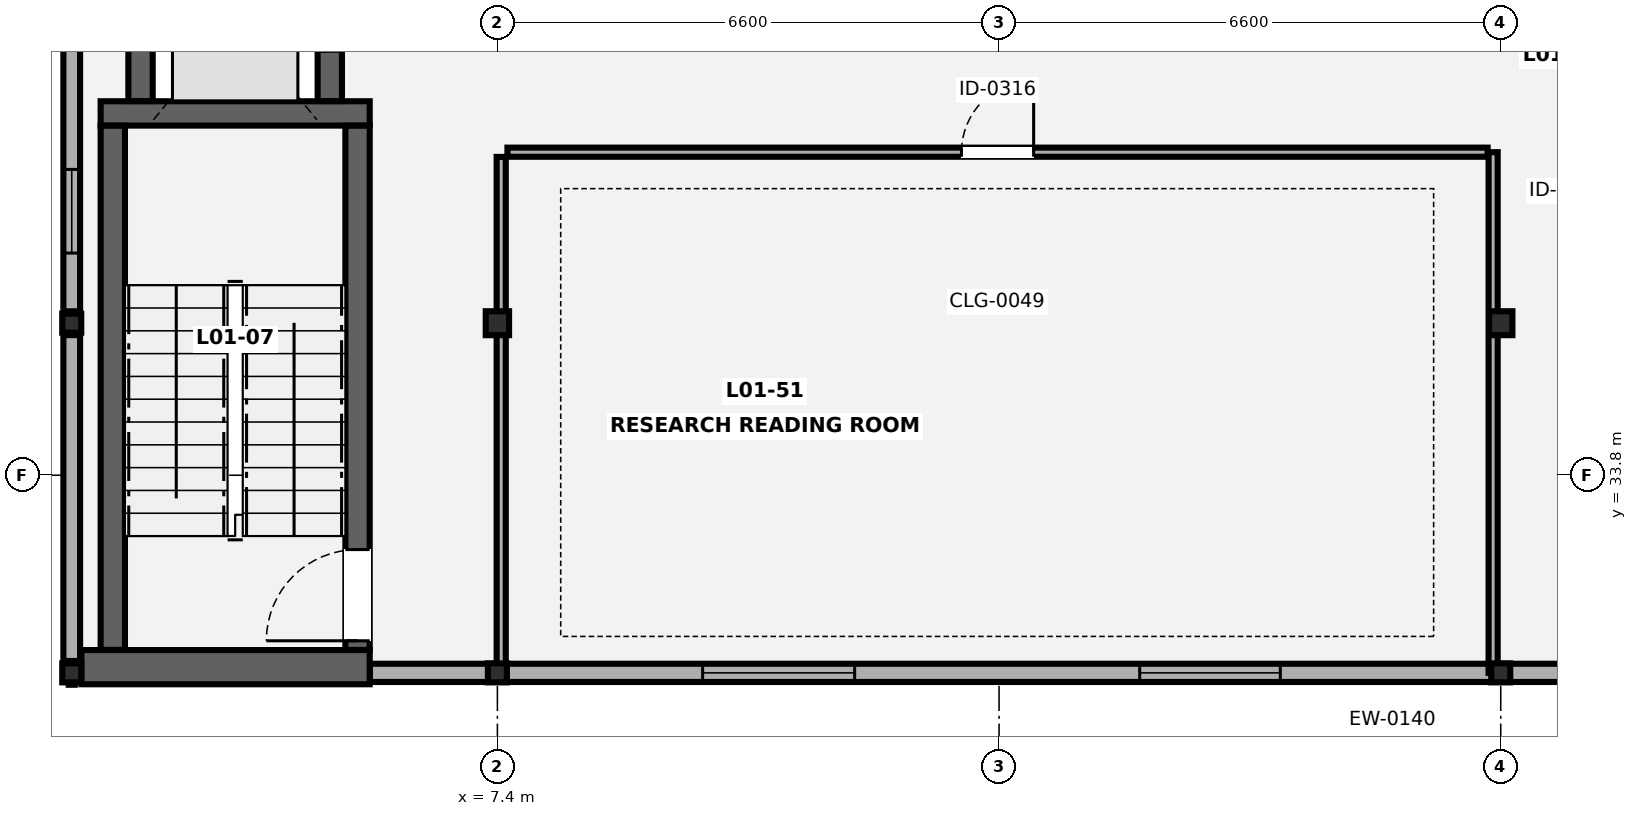
"""IFC4 building model, lengths in metres.
Left out: names, types, materials, properties, quantities, classifications, styles, units other than length and angle.
Written with IfcOpenShell. Run it as: python <this file> out.ifc"""

import sys

from ifc_helpers import new_model, si_unit, direction, frame, frame_2d, origin, origin_2d, place, context, subcontext, project, spatial, rectangle, hollow_rectangle, i_section, extrude, element, fill, save


model = new_model("IFC4")
c1 = context("Model", 3, precision=1e-05, world=origin(), true_north=direction((0.0, 1.0)))
c2 = subcontext(c1, "Body", "Model", "MODEL_VIEW")
j1 = project(units=[si_unit("LENGTHUNIT", "METRE"), si_unit("PLANEANGLEUNIT", "RADIAN")], contexts=[c1])
p1 = place(None, origin())
s1 = spatial("IfcSite", under=j1, at=p1, CompositionType="ELEMENT")
p2 = place(p1, origin())
s2 = spatial("IfcBuilding", under=s1, at=p2, CompositionType="ELEMENT")
p3 = place(p2, frame((0.0, 0.0, 4.9)))
s3 = spatial("IfcBuildingStorey", under=s2, at=p3, CompositionType="ELEMENT", Elevation=4.9)
for number, where, z_axis, x_axis in (
    (1, (1.8, 31.2, 0.0), (0.0, 0.0, 1.0), (1.0, 0.0, 0.0)),
    (2, (1.8, 35.8, 0.0), (0.0, 0.0, 1.0), (1.0, 0.0, 0.0)),
    (3, (7.4, 31.2, 0.0), (0.0, 0.0, 1.0), (1.0, 0.0, 0.0)),
):
    element("IfcColumn", number, at=place(p3, frame(where, z_axis=z_axis, x_axis=x_axis)), inside=s3, PredefinedType="COLUMN", context=c2, shape_type="SweptSolid", body=[
        extrude(hollow_rectangle(XDim=0.25, YDim=0.25, WallThickness=0.012, at=origin_2d()), origin(), (0.0, 0.0, 1.0), 4.2),
    ])
p4 = place(p3, frame((7.4, 35.8, 0.0), z_axis=(0.0, 0.0, 1.0), x_axis=(1.0, 0.0, 0.0)))
e4 = element("IfcColumn", 4, at=p4, inside=s3, PredefinedType="COLUMN", context=c2, shape_type="SweptSolid", body=[
    extrude(i_section(OverallWidth=0.307, OverallDepth=0.315, WebThickness=0.012, FlangeThickness=0.019, FilletRadius=0.017, at=origin_2d()), origin(), (0.0, 0.0, 1.0), 4.2),
])
p5 = place(p3, frame((20.6, 31.2, 0.0), z_axis=(0.0, 0.0, 1.0), x_axis=(1.0, 0.0, 0.0)))
e5 = element("IfcColumn", 5, at=p5, inside=s3, PredefinedType="COLUMN", context=c2, shape_type="SweptSolid", body=[
    extrude(hollow_rectangle(XDim=0.25, YDim=0.25, WallThickness=0.012, at=origin_2d()), origin(), (0.0, 0.0, 1.0), 4.2),
])
p6 = place(p3, frame((20.6, 35.8, 0.0), z_axis=(0.0, 0.0, 1.0), x_axis=(1.0, 0.0, 0.0)))
e6 = element("IfcColumn", 6, at=p6, inside=s3, PredefinedType="COLUMN", context=c2, shape_type="SweptSolid", body=[
    extrude(i_section(OverallWidth=0.307, OverallDepth=0.315, WebThickness=0.012, FlangeThickness=0.019, FilletRadius=0.017, at=origin_2d()), origin(), (0.0, 0.0, 1.0), 4.2),
])
p7 = place(p3, frame((1.8, 31.323, 0.0), z_axis=(0.0, 0.0, 1.0), x_axis=(0.0, 1.0, 0.0)))
e7 = element("IfcWall", 7, at=p7, inside=s3, PredefinedType="SOLIDWALL", context=c2, shape_type="SweptSolid", body=[
    extrude(rectangle(XDim=8.954, YDim=0.22, at=frame_2d((4.477, 0.0))), origin(), (0.0, 0.0, 1.0), 3.445),
])
p8 = place(p7, frame((5.4, 0.0, 0.85)))
e8 = element("IfcOpeningElement", 8, at=p8, cuts=e7, PredefinedType="OPENING", context=c2, shape_type="SweptSolid", body=[
    extrude(rectangle(XDim=1.1, YDim=1.4, at=frame_2d((0.55, 0.7))), frame((0.0, 0.12, 0.0), z_axis=(0.0, -1.0, 0.0), x_axis=(1.0, 0.0, 0.0)), (0.0, 0.0, 1.0), 0.24),
])
p9 = place(p3, frame((27.077, 31.2, 0.0), z_axis=(0.0, 0.0, 1.0), x_axis=(-1.0, 0.0, 0.0)))
e9 = element("IfcWall", 9, at=p9, inside=s3, PredefinedType="SOLIDWALL", context=c2, shape_type="SweptSolid", body=[
    extrude(rectangle(XDim=21.355, YDim=0.24, at=frame_2d((10.677, 0.0))), origin(), (0.0, 0.0, 1.0), 3.505),
])
p10 = place(p9, frame((9.377, 0.0, 0.85)))
e10 = element("IfcOpeningElement", 10, at=p10, cuts=e9, PredefinedType="OPENING", context=c2, shape_type="SweptSolid", body=[
    extrude(rectangle(XDim=1.85, YDim=1.4, at=frame_2d((0.925, 0.7))), frame((0.0, 0.13, 0.0), z_axis=(0.0, -1.0, 0.0), x_axis=(1.0, 0.0, 0.0)), (0.0, 0.0, 1.0), 0.26),
])
p11 = place(p9, frame((14.977, 0.0, 0.85)))
e11 = element("IfcOpeningElement", 11, at=p11, cuts=e9, PredefinedType="OPENING", context=c2, shape_type="SweptSolid", body=[
    extrude(rectangle(XDim=2.0, YDim=1.4, at=frame_2d((1.0, 0.7))), frame((0.0, 0.13, 0.0), z_axis=(0.0, -1.0, 0.0), x_axis=(1.0, 0.0, 0.0)), (0.0, 0.0, 1.0), 0.26),
])
p12 = place(p3, frame((1.927, 31.275, 0.0), z_axis=(0.0, 0.0, 1.0), x_axis=(1.0, 0.0, 0.0)))
e12 = element("IfcWall", 12, at=p12, inside=s3, PredefinedType="SHEAR", context=c2, shape_type="SweptSolid", body=[
    extrude(rectangle(XDim=3.793, YDim=0.45, at=frame_2d((1.896, 0.0))), origin(), (0.0, 0.0, 1.0), 4.0),
])
p13 = place(p3, frame((2.18, 38.56, 0.0), z_axis=(0.0, 0.0, 1.0), x_axis=(1.0, 0.0, 0.0)))
e13 = element("IfcWall", 13, at=p13, inside=s3, PredefinedType="SHEAR", context=c2, shape_type="SweptSolid", body=[
    extrude(rectangle(XDim=3.54, YDim=0.32, at=frame_2d((1.77, 0.0))), origin(), (0.0, 0.0, 1.0), 4.0),
])
p14 = place(p3, frame((2.34, 31.502, 0.0), z_axis=(0.0, 0.0, 1.0), x_axis=(0.0, 1.0, 0.0)))
e14 = element("IfcWall", 14, at=p14, inside=s3, PredefinedType="SHEAR", context=c2, shape_type="SweptSolid", body=[
    extrude(rectangle(XDim=6.896, YDim=0.32, at=frame_2d((3.448, 0.0))), origin(), (0.0, 0.0, 1.0), 4.0),
])
p15 = place(p3, frame((5.56, 31.502, 0.0), z_axis=(0.0, 0.0, 1.0), x_axis=(0.0, 1.0, 0.0)))
e15 = element("IfcWall", 15, at=p15, inside=s3, PredefinedType="SHEAR", context=c2, shape_type="SweptSolid", body=[
    extrude(rectangle(XDim=6.896, YDim=0.32, at=frame_2d((3.448, 0.0))), origin(), (0.0, 0.0, 1.0), 4.0),
])
p16 = place(p15, frame((0.12, 0.0, 0.0)))
e16 = element("IfcOpeningElement", 16, at=p16, cuts=e15, PredefinedType="OPENING", context=c2, shape_type="SweptSolid", body=[
    extrude(rectangle(XDim=1.2, YDim=2.15, at=frame_2d((0.6, 1.075))), frame((0.0, 0.17, 0.0), z_axis=(0.0, -1.0, 0.0), x_axis=(1.0, 0.0, 0.0)), (0.0, 0.0, 1.0), 0.34),
])
p17 = place(p3, frame((2.705, 38.722, 0.0), z_axis=(0.0, 0.0, 1.0), x_axis=(0.0, 1.0, 0.0)))
e17 = element("IfcWall", 17, at=p17, inside=s3, PredefinedType="SHEAR", context=c2, shape_type="SweptSolid", body=[
    extrude(rectangle(XDim=2.411, YDim=0.32, at=frame_2d((1.206, 0.0))), origin(), (0.0, 0.0, 1.0), 4.0),
])
p18 = place(p3, frame((5.195, 38.722, 0.0), z_axis=(0.0, 0.0, 1.0), x_axis=(0.0, 1.0, 0.0)))
e18 = element("IfcWall", 18, at=p18, inside=s3, PredefinedType="SHEAR", context=c2, shape_type="SweptSolid", body=[
    extrude(rectangle(XDim=2.411, YDim=0.32, at=frame_2d((1.206, 0.0))), origin(), (0.0, 0.0, 1.0), 4.0),
])
p19 = place(p18, frame((0.656, 0.0, 0.0)))
e19 = element("IfcOpeningElement", 19, at=p19, cuts=e18, PredefinedType="OPENING", context=c2, shape_type="SweptSolid", body=[
    extrude(rectangle(XDim=1.1, YDim=2.15, at=frame_2d((0.55, 1.075))), frame((0.0, 0.17, 0.0), z_axis=(0.0, -1.0, 0.0), x_axis=(1.0, 0.0, 0.0)), (0.0, 0.0, 1.0), 0.34),
])
p20 = place(p3, frame((7.532, 38.05, 0.0), z_axis=(0.0, 0.0, 1.0), x_axis=(1.0, 0.0, 0.0)))
e20 = element("IfcWall", 20, at=p20, inside=s3, PredefinedType="PARTITIONING", context=c2, shape_type="SweptSolid", body=[
    extrude(rectangle(XDim=12.896, YDim=0.12, at=frame_2d((6.448, 0.0))), origin(), (0.0, 0.0, 1.0), 3.598),
])
p21 = place(p20, frame((5.973, 0.0, 0.0)))
e21 = element("IfcOpeningElement", 21, at=p21, cuts=e20, PredefinedType="OPENING", context=c2, shape_type="SweptSolid", body=[
    extrude(rectangle(XDim=0.95, YDim=2.1, at=frame_2d((0.475, 1.05))), frame((0.0, 0.07, 0.0), z_axis=(0.0, -1.0, 0.0), x_axis=(1.0, 0.0, 0.0)), (0.0, 0.0, 1.0), 0.14),
])
p22 = place(p3, frame((7.45, 31.2, 0.0), z_axis=(0.0, 0.0, 1.0), x_axis=(0.0, 1.0, 0.0)))
e22 = element("IfcWall", 22, at=p22, inside=s3, PredefinedType="PARTITIONING", context=c2, shape_type="SweptSolid", body=[
    extrude(rectangle(XDim=6.788, YDim=0.12, at=frame_2d((3.394, 0.0))), origin(), (0.0, 0.0, 1.0), 3.445),
])
p23 = place(p3, frame((20.5, 31.2, 0.0), z_axis=(0.0, 0.0, 1.0), x_axis=(0.0, 1.0, 0.0)))
e23 = element("IfcWall", 23, at=p23, inside=s3, PredefinedType="PARTITIONING", context=c2, shape_type="SweptSolid", body=[
    extrude(rectangle(XDim=6.85, YDim=0.12, at=frame_2d((3.425, 0.0))), origin(), (0.0, 0.0, 1.0), 3.445),
])
p24 = place(p8, origin())
e24 = element("IfcWindow", 24, at=p24, inside=s3, PartitioningType="SINGLE_PANEL", PredefinedType="WINDOW", context=c2, shape_type="SweptSolid", body=[
    extrude(rectangle(XDim=1.1, YDim=1.4, at=frame_2d((0.55, 0.7))), frame((0.0, 0.03, 0.0), z_axis=(0.0, -1.0, 0.0), x_axis=(1.0, 0.0, 0.0)), (0.0, 0.0, 1.0), 0.06),
])
fill(e8, e24)
p25 = place(p10, origin())
e25 = element("IfcWindow", 25, at=p25, inside=s3, PartitioningType="SINGLE_PANEL", PredefinedType="WINDOW", context=c2, shape_type="SweptSolid", body=[
    extrude(rectangle(XDim=1.85, YDim=1.4, at=frame_2d((0.925, 0.7))), frame((0.0, 0.03, 0.0), z_axis=(0.0, -1.0, 0.0), x_axis=(1.0, 0.0, 0.0)), (0.0, 0.0, 1.0), 0.06),
])
fill(e10, e25)
p26 = place(p11, origin())
e26 = element("IfcWindow", 26, at=p26, inside=s3, PartitioningType="SINGLE_PANEL", PredefinedType="WINDOW", context=c2, shape_type="SweptSolid", body=[
    extrude(rectangle(XDim=2.0, YDim=1.4, at=frame_2d((1.0, 0.7))), frame((0.0, 0.03, 0.0), z_axis=(0.0, -1.0, 0.0), x_axis=(1.0, 0.0, 0.0)), (0.0, 0.0, 1.0), 0.06),
])
fill(e11, e26)
p27 = place(p16, origin())
e27 = element("IfcDoor", 27, at=p27, inside=s3, OperationType="SINGLE_SWING_LEFT", PredefinedType="DOOR", context=c2, shape_type="SweptSolid", body=[
    extrude(rectangle(XDim=1.2, YDim=2.15, at=frame_2d((0.6, 1.075))), frame((0.0, 0.025, 0.0), z_axis=(0.0, -1.0, 0.0), x_axis=(1.0, 0.0, 0.0)), (0.0, 0.0, 1.0), 0.05),
])
fill(e16, e27)
p28 = place(p21, origin())
e28 = element("IfcDoor", 28, at=p28, inside=s3, OperationType="SINGLE_SWING_RIGHT", PredefinedType="DOOR", context=c2, shape_type="SweptSolid", body=[
    extrude(rectangle(XDim=0.95, YDim=2.1, at=frame_2d((0.475, 1.05))), frame((0.0, 0.025, 0.0), z_axis=(0.0, -1.0, 0.0), x_axis=(1.0, 0.0, 0.0)), (0.0, 0.0, 1.0), 0.05),
])
fill(e21, e28)
save(model, sys.argv[1])
